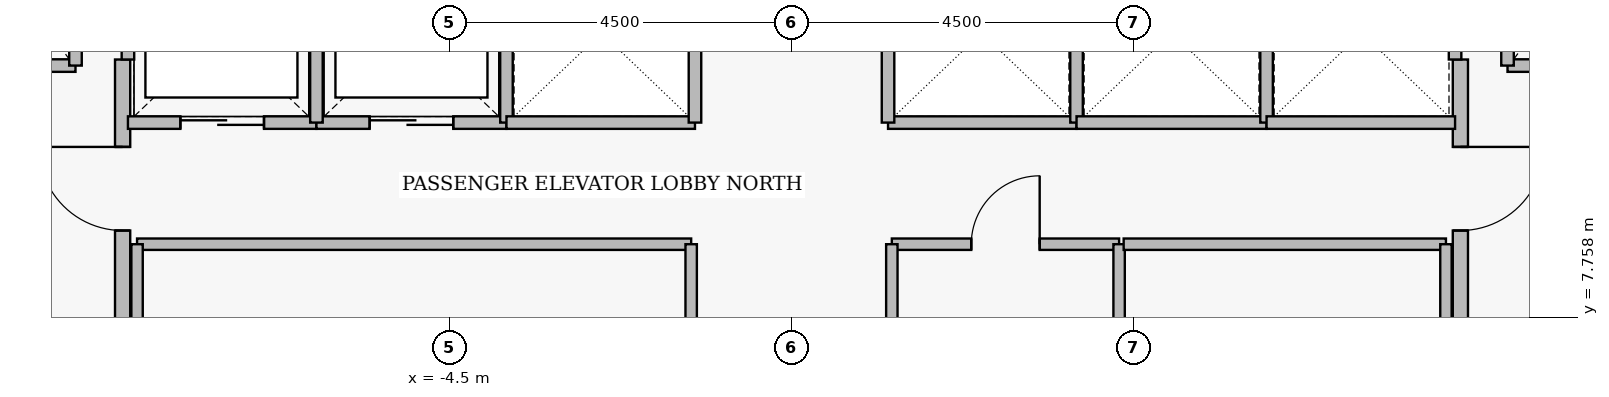
"""IFC4 building model, lengths in metres.
Left out: names, types, materials, properties, quantities, classifications, styles, units other than length and angle.
Written with IfcOpenShell. Run it as: python <this file> out.ifc"""

import sys

from ifc_helpers import new_model, si_unit, direction, frame, frame_2d, origin, place, context, subcontext, project, spatial, rectangle, extrude, element, fill, save


model = new_model("IFC4")
c1 = context("Model", 3, precision=1e-05, world=origin(), true_north=direction((0.0, 1.0)))
c2 = subcontext(c1, "Body", "Model", "MODEL_VIEW")
j1 = project(units=[si_unit("LENGTHUNIT", "METRE"), si_unit("PLANEANGLEUNIT", "RADIAN")], contexts=[c1])
p1 = place(None, origin())
s1 = spatial("IfcSite", under=j1, at=p1, CompositionType="ELEMENT")
p2 = place(p1, origin())
s2 = spatial("IfcBuilding", under=s1, at=p2, CompositionType="ELEMENT")
p3 = place(p2, frame((0.0, 0.0, 106.6)))
s3 = spatial("IfcBuildingStorey", under=s2, at=p3, CompositionType="ELEMENT", Elevation=106.6)
p4 = place(p3, frame((-8.8, 5.05, 0.0), z_axis=(0.0, 0.0, 1.0), x_axis=(0.0, 1.0, 0.0)))
e1 = element("IfcWall", 1, at=p4, inside=s3, PredefinedType="PARTITIONING", context=c2, shape_type="SweptSolid", body=[
    extrude(rectangle(XDim=6.1, YDim=0.2, at=frame_2d((3.05, 0.0))), origin(), (0.0, 0.0, 1.0), 3.43),
])
p5 = place(p4, frame((0.25, 0.0, 0.0)))
e2 = element("IfcOpeningElement", 2, at=p5, cuts=e1, PredefinedType="OPENING", context=c2, shape_type="SweptSolid", body=[
    extrude(rectangle(XDim=1.1, YDim=2.2, at=frame_2d((0.55, 1.1))), frame((0.0, 0.11, 0.0), z_axis=(0.0, -1.0, 0.0), x_axis=(1.0, 0.0, 0.0)), (0.0, 0.0, 1.0), 0.22),
])
p6 = place(p4, frame((3.85, 0.0, 0.0)))
e3 = element("IfcOpeningElement", 3, at=p6, cuts=e1, PredefinedType="OPENING", context=c2, shape_type="SweptSolid", body=[
    extrude(rectangle(XDim=1.1, YDim=2.2, at=frame_2d((0.55, 1.1))), frame((0.0, 0.11, 0.0), z_axis=(0.0, -1.0, 0.0), x_axis=(1.0, 0.0, 0.0)), (0.0, 0.0, 1.0), 0.22),
])
p7 = place(p3, frame((8.8, 11.15, 0.0), z_axis=(0.0, 0.0, 1.0), x_axis=(0.0, -1.0, 0.0)))
e4 = element("IfcWall", 4, at=p7, inside=s3, PredefinedType="PARTITIONING", context=c2, shape_type="SweptSolid", body=[
    extrude(rectangle(XDim=6.1, YDim=0.2, at=frame_2d((3.05, 0.0))), origin(), (0.0, 0.0, 1.0), 3.43),
])
p8 = place(p7, frame((1.15, 0.0, 0.0)))
e5 = element("IfcOpeningElement", 5, at=p8, cuts=e4, PredefinedType="OPENING", context=c2, shape_type="SweptSolid", body=[
    extrude(rectangle(XDim=1.1, YDim=2.2, at=frame_2d((0.55, 1.1))), frame((0.0, 0.11, 0.0), z_axis=(0.0, -1.0, 0.0), x_axis=(1.0, 0.0, 0.0)), (0.0, 0.0, 1.0), 0.22),
])
p9 = place(p7, frame((4.75, 0.0, 0.0)))
e6 = element("IfcOpeningElement", 6, at=p9, cuts=e4, PredefinedType="OPENING", context=c2, shape_type="SweptSolid", body=[
    extrude(rectangle(XDim=1.1, YDim=2.2, at=frame_2d((0.55, 1.1))), frame((0.0, 0.11, 0.0), z_axis=(0.0, -1.0, 0.0), x_axis=(1.0, 0.0, 0.0)), (0.0, 0.0, 1.0), 0.22),
])
p10 = place(p3, frame((-11.58, 11.07, 0.0), z_axis=(0.0, 0.0, 1.0), x_axis=(1.0, 0.0, 0.0)))
e7 = element("IfcWall", 7, at=p10, inside=s3, PredefinedType="PARTITIONING", context=c2, shape_type="SweptSolid", body=[
    extrude(rectangle(XDim=2.16, YDim=0.165, at=frame_2d((1.08, 0.0))), origin(), (0.0, 0.0, 1.0), 3.43),
])
p11 = place(p10, frame((0.53, 0.0, 0.0)))
e8 = element("IfcOpeningElement", 8, at=p11, cuts=e7, PredefinedType="OPENING", context=c2, shape_type="SweptSolid", body=[
    extrude(rectangle(XDim=1.15, YDim=2.25, at=frame_2d((0.575, 1.125))), frame((0.0, 0.093, 0.0), z_axis=(0.0, -1.0, 0.0), x_axis=(1.0, 0.0, 0.0)), (0.0, 0.0, 1.0), 0.185),
])
p12 = place(p3, frame((9.42, 11.07, 0.0), z_axis=(0.0, 0.0, 1.0), x_axis=(1.0, 0.0, 0.0)))
e9 = element("IfcWall", 9, at=p12, inside=s3, PredefinedType="PARTITIONING", context=c2, shape_type="SweptSolid", body=[
    extrude(rectangle(XDim=2.16, YDim=0.165, at=frame_2d((1.08, 0.0))), origin(), (0.0, 0.0, 1.0), 3.43),
])
p13 = place(p12, frame((0.53, 0.0, 0.0)))
e10 = element("IfcOpeningElement", 10, at=p13, cuts=e9, PredefinedType="OPENING", context=c2, shape_type="SweptSolid", body=[
    extrude(rectangle(XDim=1.15, YDim=2.25, at=frame_2d((0.575, 1.125))), frame((0.0, 0.093, 0.0), z_axis=(0.0, -1.0, 0.0), x_axis=(1.0, 0.0, 0.0)), (0.0, 0.0, 1.0), 0.185),
])
p14 = place(p3, frame((-8.73, 10.32, 0.0), z_axis=(0.0, 0.0, 1.0), x_axis=(1.0, 0.0, 0.0)))
e11 = element("IfcWall", 11, at=p14, inside=s3, PredefinedType="PARTITIONING", context=c2, shape_type="SweptSolid", body=[
    extrude(rectangle(XDim=2.48, YDim=0.165, at=frame_2d((1.24, 0.0))), origin(), (0.0, 0.0, 1.0), 3.43),
])
p15 = place(p14, frame((0.69, 0.0, 0.0)))
e12 = element("IfcOpeningElement", 12, at=p15, cuts=e11, PredefinedType="OPENING", context=c2, shape_type="SweptSolid", body=[
    extrude(rectangle(XDim=1.1, YDim=2.25, at=frame_2d((0.55, 1.125))), frame((0.0, 0.093, 0.0), z_axis=(0.0, -1.0, 0.0), x_axis=(1.0, 0.0, 0.0)), (0.0, 0.0, 1.0), 0.185),
])
p16 = place(p3, frame((-6.25, 10.32, 0.0), z_axis=(0.0, 0.0, 1.0), x_axis=(1.0, 0.0, 0.0)))
e13 = element("IfcWall", 13, at=p16, inside=s3, PredefinedType="PARTITIONING", context=c2, shape_type="SweptSolid", body=[
    extrude(rectangle(XDim=2.5, YDim=0.165, at=frame_2d((1.25, 0.0))), origin(), (0.0, 0.0, 1.0), 3.43),
])
p17 = place(p16, frame((0.7, 0.0, 0.0)))
e14 = element("IfcOpeningElement", 14, at=p17, cuts=e13, PredefinedType="OPENING", context=c2, shape_type="SweptSolid", body=[
    extrude(rectangle(XDim=1.1, YDim=2.25, at=frame_2d((0.55, 1.125))), frame((0.0, 0.093, 0.0), z_axis=(0.0, -1.0, 0.0), x_axis=(1.0, 0.0, 0.0)), (0.0, 0.0, 1.0), 0.185),
])
p18 = place(p3, frame((1.32, 8.72, 0.0), z_axis=(0.0, 0.0, 1.0), x_axis=(1.0, 0.0, 0.0)))
e15 = element("IfcWall", 15, at=p18, inside=s3, PredefinedType="PARTITIONING", context=c2, shape_type="SweptSolid", body=[
    extrude(rectangle(XDim=2.99, YDim=0.15, at=frame_2d((1.495, 0.0))), origin(), (0.0, 0.0, 1.0), 3.43),
])
p19 = place(p18, frame((1.045, 0.0, 0.0)))
e16 = element("IfcOpeningElement", 16, at=p19, cuts=e15, PredefinedType="OPENING", context=c2, shape_type="SweptSolid", body=[
    extrude(rectangle(XDim=0.9, YDim=2.15, at=frame_2d((0.45, 1.075))), frame((0.0, 0.085, 0.0), z_axis=(0.0, -1.0, 0.0), x_axis=(1.0, 0.0, 0.0)), (0.0, 0.0, 1.0), 0.17),
])
for number, where, z_axis, x_axis in (
    (17, (-9.42, 11.07, 0.0), (0.0, 0.0, 1.0), (0.0, 1.0, 0.0)),
    (18, (9.42, 11.07, 0.0), (0.0, 0.0, 1.0), (0.0, 1.0, 0.0)),
):
    element("IfcWall", number, at=place(p3, frame(where, z_axis=z_axis, x_axis=x_axis)), inside=s3, PredefinedType="PARTITIONING", context=c2, shape_type="SweptSolid", body=[
        extrude(rectangle(XDim=2.96, YDim=0.165, at=frame_2d((1.48, 0.0))), origin(), (0.0, 0.0, 1.0), 3.43),
    ])
p20 = place(p3, frame((-8.73, 11.15, 0.0), z_axis=(0.0, 0.0, 1.0), x_axis=(0.0, 1.0, 0.0)))
e19 = element("IfcWall", 19, at=p20, inside=s3, PredefinedType="PARTITIONING", context=c2, shape_type="SweptSolid", body=[
    extrude(rectangle(XDim=1.53, YDim=0.165, at=frame_2d((0.765, 0.0))), origin(), (0.0, 0.0, 1.0), 3.43),
])
for number, where, z_axis, x_axis in (
    (20, (-6.25, 10.32, 0.0), (0.0, 0.0, 1.0), (0.0, 1.0, 0.0)),
    (21, (-3.75, 10.32, 0.0), (0.0, 0.0, 1.0), (0.0, 1.0, 0.0)),
):
    element("IfcWall", number, at=place(p3, frame(where, z_axis=z_axis, x_axis=x_axis)), inside=s3, PredefinedType="PARTITIONING", context=c2, shape_type="SweptSolid", body=[
        extrude(rectangle(XDim=2.36, YDim=0.165, at=frame_2d((1.18, 0.0))), origin(), (0.0, 0.0, 1.0), 3.43),
    ])
p21 = place(p3, frame((-3.75, 10.32, 0.0), z_axis=(0.0, 0.0, 1.0), x_axis=(1.0, 0.0, 0.0)))
e22 = element("IfcWall", 22, at=p21, inside=s3, PredefinedType="PARTITIONING", context=c2, shape_type="SweptSolid", body=[
    extrude(rectangle(XDim=2.48, YDim=0.165, at=frame_2d((1.24, 0.0))), origin(), (0.0, 0.0, 1.0), 3.43),
])
p22 = place(p3, frame((-1.27, 10.32, 0.0), z_axis=(0.0, 0.0, 1.0), x_axis=(0.0, 1.0, 0.0)))
e23 = element("IfcWall", 23, at=p22, inside=s3, PredefinedType="PARTITIONING", context=c2, shape_type="SweptSolid", body=[
    extrude(rectangle(XDim=2.36, YDim=0.165, at=frame_2d((1.18, 0.0))), origin(), (0.0, 0.0, 1.0), 3.43),
])
p23 = place(p3, frame((1.27, 10.32, 0.0), z_axis=(0.0, 0.0, 1.0), x_axis=(1.0, 0.0, 0.0)))
e24 = element("IfcWall", 24, at=p23, inside=s3, PredefinedType="PARTITIONING", context=c2, shape_type="SweptSolid", body=[
    extrude(rectangle(XDim=2.48, YDim=0.165, at=frame_2d((1.24, 0.0))), origin(), (0.0, 0.0, 1.0), 3.43),
])
for number, where, z_axis, x_axis in (
    (25, (1.27, 10.32, 0.0), (0.0, 0.0, 1.0), (0.0, 1.0, 0.0)),
    (26, (3.75, 10.32, 0.0), (0.0, 0.0, 1.0), (0.0, 1.0, 0.0)),
):
    element("IfcWall", number, at=place(p3, frame(where, z_axis=z_axis, x_axis=x_axis)), inside=s3, PredefinedType="PARTITIONING", context=c2, shape_type="SweptSolid", body=[
        extrude(rectangle(XDim=2.36, YDim=0.165, at=frame_2d((1.18, 0.0))), origin(), (0.0, 0.0, 1.0), 3.43),
    ])
p24 = place(p3, frame((3.75, 10.32, 0.0), z_axis=(0.0, 0.0, 1.0), x_axis=(1.0, 0.0, 0.0)))
e27 = element("IfcWall", 27, at=p24, inside=s3, PredefinedType="PARTITIONING", context=c2, shape_type="SweptSolid", body=[
    extrude(rectangle(XDim=2.5, YDim=0.165, at=frame_2d((1.25, 0.0))), origin(), (0.0, 0.0, 1.0), 3.43),
])
p25 = place(p3, frame((6.25, 10.32, 0.0), z_axis=(0.0, 0.0, 1.0), x_axis=(0.0, 1.0, 0.0)))
e28 = element("IfcWall", 28, at=p25, inside=s3, PredefinedType="PARTITIONING", context=c2, shape_type="SweptSolid", body=[
    extrude(rectangle(XDim=2.36, YDim=0.165, at=frame_2d((1.18, 0.0))), origin(), (0.0, 0.0, 1.0), 3.43),
])
p26 = place(p3, frame((6.25, 10.32, 0.0), z_axis=(0.0, 0.0, 1.0), x_axis=(1.0, 0.0, 0.0)))
e29 = element("IfcWall", 29, at=p26, inside=s3, PredefinedType="PARTITIONING", context=c2, shape_type="SweptSolid", body=[
    extrude(rectangle(XDim=2.48, YDim=0.165, at=frame_2d((1.24, 0.0))), origin(), (0.0, 0.0, 1.0), 3.43),
])
p27 = place(p3, frame((8.73, 11.15, 0.0), z_axis=(0.0, 0.0, 1.0), x_axis=(0.0, 1.0, 0.0)))
e30 = element("IfcWall", 30, at=p27, inside=s3, PredefinedType="PARTITIONING", context=c2, shape_type="SweptSolid", body=[
    extrude(rectangle(XDim=1.53, YDim=0.165, at=frame_2d((0.765, 0.0))), origin(), (0.0, 0.0, 1.0), 3.43),
])
p28 = place(p3, frame((-8.61, 8.72, 0.0), z_axis=(0.0, 0.0, 1.0), x_axis=(1.0, 0.0, 0.0)))
e31 = element("IfcWall", 31, at=p28, inside=s3, PredefinedType="PARTITIONING", context=c2, shape_type="SweptSolid", body=[
    extrude(rectangle(XDim=7.29, YDim=0.15, at=frame_2d((3.645, 0.0))), origin(), (0.0, 0.0, 1.0), 3.43),
])
for number, where, z_axis, x_axis in (
    (32, (-8.61, 6.48, 0.0), (0.0, 0.0, 1.0), (0.0, 1.0, 0.0)),
    (33, (-1.32, 6.48, 0.0), (0.0, 0.0, 1.0), (0.0, 1.0, 0.0)),
    (34, (1.32, 6.48, 0.0), (0.0, 0.0, 1.0), (0.0, 1.0, 0.0)),
    (35, (4.31, 6.48, 0.0), (0.0, 0.0, 1.0), (0.0, 1.0, 0.0)),
):
    element("IfcWall", number, at=place(p3, frame(where, z_axis=z_axis, x_axis=x_axis)), inside=s3, PredefinedType="PARTITIONING", context=c2, shape_type="SweptSolid", body=[
        extrude(rectangle(XDim=2.24, YDim=0.15, at=frame_2d((1.12, 0.0))), origin(), (0.0, 0.0, 1.0), 3.43),
    ])
p29 = place(p3, frame((4.37, 8.72, 0.0), z_axis=(0.0, 0.0, 1.0), x_axis=(1.0, 0.0, 0.0)))
e36 = element("IfcWall", 36, at=p29, inside=s3, PredefinedType="PARTITIONING", context=c2, shape_type="SweptSolid", body=[
    extrude(rectangle(XDim=4.24, YDim=0.15, at=frame_2d((2.12, 0.0))), origin(), (0.0, 0.0, 1.0), 3.43),
])
p30 = place(p3, frame((8.61, 6.48, 0.0), z_axis=(0.0, 0.0, 1.0), x_axis=(0.0, 1.0, 0.0)))
e37 = element("IfcWall", 37, at=p30, inside=s3, PredefinedType="PARTITIONING", context=c2, shape_type="SweptSolid", body=[
    extrude(rectangle(XDim=2.24, YDim=0.15, at=frame_2d((1.12, 0.0))), origin(), (0.0, 0.0, 1.0), 3.43),
])
p31 = place(p6, origin())
e38 = element("IfcDoor", 38, at=p31, inside=s3, OperationType="SINGLE_SWING_RIGHT", PredefinedType="DOOR", context=c2, shape_type="SweptSolid", body=[
    extrude(rectangle(XDim=1.1, YDim=2.2, at=frame_2d((0.55, 1.1))), frame((0.0, 0.025, 0.0), z_axis=(0.0, -1.0, 0.0), x_axis=(1.0, 0.0, 0.0)), (0.0, 0.0, 1.0), 0.05),
])
fill(e3, e38)
p32 = place(p8, origin())
e39 = element("IfcDoor", 39, at=p32, inside=s3, OperationType="SINGLE_SWING_LEFT", PredefinedType="DOOR", context=c2, shape_type="SweptSolid", body=[
    extrude(rectangle(XDim=1.1, YDim=2.2, at=frame_2d((0.55, 1.1))), frame((0.0, 0.025, 0.0), z_axis=(0.0, -1.0, 0.0), x_axis=(1.0, 0.0, 0.0)), (0.0, 0.0, 1.0), 0.05),
])
fill(e5, e39)
p33 = place(p15, origin())
e40 = element("IfcDoor", 40, at=p33, inside=s3, OperationType="SLIDING_TO_LEFT", PredefinedType="DOOR", context=c2, shape_type="SweptSolid", body=[
    extrude(rectangle(XDim=1.1, YDim=2.25, at=frame_2d((0.55, 1.125))), frame((0.0, 0.025, 0.0), z_axis=(0.0, -1.0, 0.0), x_axis=(1.0, 0.0, 0.0)), (0.0, 0.0, 1.0), 0.05),
])
fill(e12, e40)
p34 = place(p17, origin())
e41 = element("IfcDoor", 41, at=p34, inside=s3, OperationType="SLIDING_TO_LEFT", PredefinedType="DOOR", context=c2, shape_type="SweptSolid", body=[
    extrude(rectangle(XDim=1.1, YDim=2.25, at=frame_2d((0.55, 1.125))), frame((0.0, 0.025, 0.0), z_axis=(0.0, -1.0, 0.0), x_axis=(1.0, 0.0, 0.0)), (0.0, 0.0, 1.0), 0.05),
])
fill(e14, e41)
p35 = place(p19, origin())
e42 = element("IfcDoor", 42, at=p35, inside=s3, OperationType="SINGLE_SWING_RIGHT", PredefinedType="DOOR", context=c2, shape_type="SweptSolid", body=[
    extrude(rectangle(XDim=0.9, YDim=2.15, at=frame_2d((0.45, 1.075))), frame((0.0, 0.025, 0.0), z_axis=(0.0, -1.0, 0.0), x_axis=(1.0, 0.0, 0.0)), (0.0, 0.0, 1.0), 0.05),
])
fill(e16, e42)
save(model, sys.argv[1])
